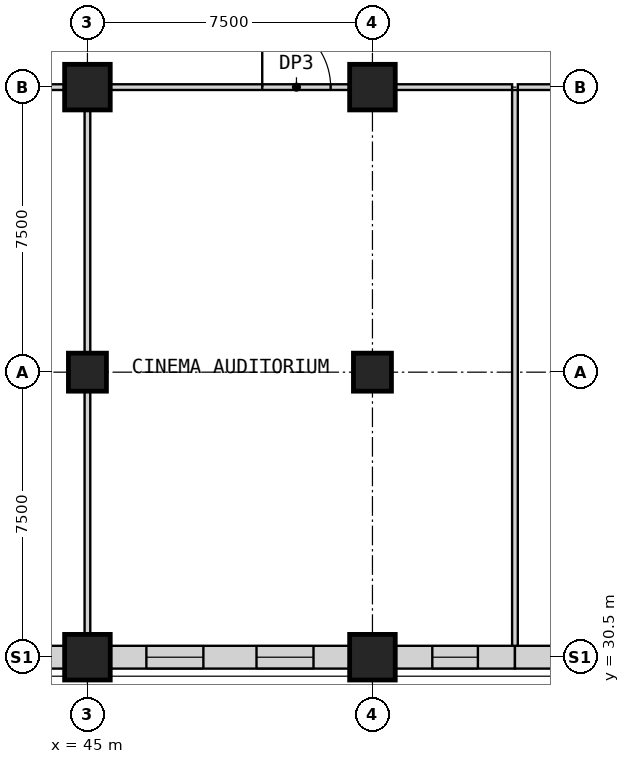
"""IFC4 building model, lengths in metres.
Left out: names, types, materials, properties, quantities, classifications, styles, units other than length and angle.
Written with IfcOpenShell. Run it as: python <this file> out.ifc"""

import sys

from ifc_helpers import new_model, si_unit, direction, frame, frame_2d, origin, origin_2d, place, context, subcontext, project, spatial, rectangle, extrude, element, fill, save


model = new_model("IFC4")
c1 = context("Model", 3, precision=1e-05, world=origin(), true_north=direction((0.0, 1.0)))
c2 = subcontext(c1, "Body", "Model", "MODEL_VIEW")
j1 = project(units=[si_unit("LENGTHUNIT", "METRE"), si_unit("PLANEANGLEUNIT", "RADIAN")], contexts=[c1])
p1 = place(None, origin())
s1 = spatial("IfcSite", under=j1, at=p1, CompositionType="ELEMENT")
p2 = place(p1, origin())
s2 = spatial("IfcBuilding", under=s1, at=p2, CompositionType="ELEMENT")
p3 = place(p2, frame((0.0, 0.0, 18.5)))
s3 = spatial("IfcBuildingStorey", under=s2, at=p3, CompositionType="ELEMENT", Elevation=18.5)
p4 = place(p3, frame((45.0, 38.0, 0.0), z_axis=(0.0, 0.0, 1.0), x_axis=(1.0, 0.0, 0.0)))
e1 = element("IfcColumn", 1, at=p4, inside=s3, PredefinedType="COLUMN", context=c2, shape_type="SweptSolid", body=[
    extrude(rectangle(XDim=1.0, YDim=1.0, at=origin_2d()), origin(), (0.0, 0.0, 1.0), 5.0),
])
p5 = place(p3, frame((45.0, 45.5, 0.0), z_axis=(0.0, 0.0, 1.0), x_axis=(1.0, 0.0, 0.0)))
e2 = element("IfcColumn", 2, at=p5, inside=s3, PredefinedType="COLUMN", context=c2, shape_type="SweptSolid", body=[
    extrude(rectangle(XDim=1.2, YDim=1.2, at=origin_2d()), origin(), (0.0, 0.0, 1.0), 5.0),
])
p6 = place(p3, frame((52.5, 38.0, 0.0), z_axis=(0.0, 0.0, 1.0), x_axis=(1.0, 0.0, 0.0)))
e3 = element("IfcColumn", 3, at=p6, inside=s3, PredefinedType="COLUMN", context=c2, shape_type="SweptSolid", body=[
    extrude(rectangle(XDim=1.0, YDim=1.0, at=origin_2d()), origin(), (0.0, 0.0, 1.0), 5.0),
])
for number, where, z_axis, x_axis in (
    (4, (52.5, 45.5, 0.0), (0.0, 0.0, 1.0), (1.0, 0.0, 0.0)),
    (5, (45.0, 30.5, 0.0), (0.0, 0.0, 1.0), (1.0, 0.0, 0.0)),
    (6, (52.5, 30.5, 0.0), (0.0, 0.0, 1.0), (1.0, 0.0, 0.0)),
):
    element("IfcColumn", number, at=place(p3, frame(where, z_axis=z_axis, x_axis=x_axis)), inside=s3, PredefinedType="COLUMN", context=c2, shape_type="SweptSolid", body=[
        extrude(rectangle(XDim=1.2, YDim=1.2, at=origin_2d()), origin(), (0.0, 0.0, 1.0), 5.0),
    ])
p7 = place(p3, frame((38.1, 30.5, 0.0), z_axis=(0.0, 0.0, 1.0), x_axis=(1.0, 0.0, 0.0)))
e7 = element("IfcWall", 7, at=p7, inside=s3, PredefinedType="PARTITIONING", context=c2, shape_type="SweptSolid", body=[
    extrude(rectangle(XDim=6.3, YDim=0.6, at=frame_2d((3.15, 0.0))), origin(), (0.0, 0.0, 1.0), 4.1),
])
p8 = place(p7, frame((0.951, 0.0, 0.9)))
e8 = element("IfcOpeningElement", 8, at=p8, cuts=e7, PredefinedType="OPENING", context=c2, shape_type="SweptSolid", body=[
    extrude(rectangle(XDim=1.5, YDim=2.8, at=frame_2d((0.75, 1.4))), frame((0.0, 0.31, 0.0), z_axis=(0.0, -1.0, 0.0), x_axis=(1.0, 0.0, 0.0)), (0.0, 0.0, 1.0), 0.62),
])
p9 = place(p7, frame((3.849, 0.0, 0.9)))
e9 = element("IfcOpeningElement", 9, at=p9, cuts=e7, PredefinedType="OPENING", context=c2, shape_type="SweptSolid", body=[
    extrude(rectangle(XDim=1.5, YDim=2.8, at=frame_2d((0.75, 1.4))), frame((0.0, 0.31, 0.0), z_axis=(0.0, -1.0, 0.0), x_axis=(1.0, 0.0, 0.0)), (0.0, 0.0, 1.0), 0.62),
])
p10 = place(p3, frame((45.6, 30.5, 0.0), z_axis=(0.0, 0.0, 1.0), x_axis=(1.0, 0.0, 0.0)))
e10 = element("IfcWall", 10, at=p10, inside=s3, PredefinedType="PARTITIONING", context=c2, shape_type="SweptSolid", body=[
    extrude(rectangle(XDim=6.3, YDim=0.6, at=frame_2d((3.15, 0.0))), origin(), (0.0, 0.0, 1.0), 4.1),
])
p11 = place(p10, frame((0.951, 0.0, 0.9)))
e11 = element("IfcOpeningElement", 11, at=p11, cuts=e10, PredefinedType="OPENING", context=c2, shape_type="SweptSolid", body=[
    extrude(rectangle(XDim=1.5, YDim=2.8, at=frame_2d((0.75, 1.4))), frame((0.0, 0.31, 0.0), z_axis=(0.0, -1.0, 0.0), x_axis=(1.0, 0.0, 0.0)), (0.0, 0.0, 1.0), 0.62),
])
p12 = place(p10, frame((3.849, 0.0, 0.9)))
e12 = element("IfcOpeningElement", 12, at=p12, cuts=e10, PredefinedType="OPENING", context=c2, shape_type="SweptSolid", body=[
    extrude(rectangle(XDim=1.5, YDim=2.8, at=frame_2d((0.75, 1.4))), frame((0.0, 0.31, 0.0), z_axis=(0.0, -1.0, 0.0), x_axis=(1.0, 0.0, 0.0)), (0.0, 0.0, 1.0), 0.62),
])
p13 = place(p3, frame((53.1, 30.5, 0.0), z_axis=(0.0, 0.0, 1.0), x_axis=(1.0, 0.0, 0.0)))
e13 = element("IfcWall", 13, at=p13, inside=s3, PredefinedType="PARTITIONING", context=c2, shape_type="SweptSolid", body=[
    extrude(rectangle(XDim=3.15, YDim=0.6, at=frame_2d((1.575, 0.0))), origin(), (0.0, 0.0, 1.0), 4.1),
])
p14 = place(p13, frame((0.975, 0.0, 0.9)))
e14 = element("IfcOpeningElement", 14, at=p14, cuts=e13, PredefinedType="OPENING", context=c2, shape_type="SweptSolid", body=[
    extrude(rectangle(XDim=1.2, YDim=2.8, at=frame_2d((0.6, 1.4))), frame((0.0, 0.31, 0.0), z_axis=(0.0, -1.0, 0.0), x_axis=(1.0, 0.0, 0.0)), (0.0, 0.0, 1.0), 0.62),
])
p15 = place(p3, frame((56.25, 30.5, 0.0), z_axis=(0.0, 0.0, 1.0), x_axis=(1.0, 0.0, 0.0)))
e15 = element("IfcWall", 15, at=p15, inside=s3, PredefinedType="PARTITIONING", context=c2, shape_type="SweptSolid", body=[
    extrude(rectangle(XDim=3.15, YDim=0.6, at=frame_2d((1.575, 0.0))), origin(), (0.0, 0.0, 1.0), 4.1),
])
p16 = place(p15, frame((0.975, 0.0, 0.9)))
e16 = element("IfcOpeningElement", 16, at=p16, cuts=e15, PredefinedType="OPENING", context=c2, shape_type="SweptSolid", body=[
    extrude(rectangle(XDim=1.2, YDim=2.8, at=frame_2d((0.6, 1.4))), frame((0.0, 0.31, 0.0), z_axis=(0.0, -1.0, 0.0), x_axis=(1.0, 0.0, 0.0)), (0.0, 0.0, 1.0), 0.62),
])
p17 = place(p3, frame((38.1, 45.5, 0.0), z_axis=(0.0, 0.0, 1.0), x_axis=(1.0, 0.0, 0.0)))
e17 = element("IfcWall", 17, at=p17, inside=s3, PredefinedType="PARTITIONING", context=c2, shape_type="SweptSolid", body=[
    extrude(rectangle(XDim=6.3, YDim=0.15, at=frame_2d((3.15, 0.0))), origin(), (0.0, 0.0, 1.0), 4.7),
])
p18 = place(p17, frame((2.25, 0.0, 0.0)))
e18 = element("IfcOpeningElement", 18, at=p18, cuts=e17, PredefinedType="OPENING", context=c2, shape_type="SweptSolid", body=[
    extrude(rectangle(XDim=1.8, YDim=2.4, at=frame_2d((0.9, 1.2))), frame((0.0, 0.085, 0.0), z_axis=(0.0, -1.0, 0.0), x_axis=(1.0, 0.0, 0.0)), (0.0, 0.0, 1.0), 0.17),
])
p19 = place(p3, frame((45.6, 45.5, 0.0), z_axis=(0.0, 0.0, 1.0), x_axis=(1.0, 0.0, 0.0)))
e19 = element("IfcWall", 19, at=p19, inside=s3, PredefinedType="PARTITIONING", context=c2, shape_type="SweptSolid", body=[
    extrude(rectangle(XDim=6.3, YDim=0.15, at=frame_2d((3.15, 0.0))), origin(), (0.0, 0.0, 1.0), 4.7),
])
p20 = place(p19, frame((4.0, 0.0, 0.0)))
e20 = element("IfcOpeningElement", 20, at=p20, cuts=e19, PredefinedType="OPENING", context=c2, shape_type="SweptSolid", body=[
    extrude(rectangle(XDim=1.8, YDim=2.4, at=frame_2d((0.9, 1.2))), frame((0.0, 0.085, 0.0), z_axis=(0.0, -1.0, 0.0), x_axis=(1.0, 0.0, 0.0)), (0.0, 0.0, 1.0), 0.17),
])
for number, where, z_axis, x_axis in (
    (21, (53.1, 45.5, 0.0), (0.0, 0.0, 1.0), (1.0, 0.0, 0.0)),
    (22, (56.325, 45.5, 0.0), (0.0, 0.0, 1.0), (1.0, 0.0, 0.0)),
):
    element("IfcWall", number, at=place(p3, frame(where, z_axis=z_axis, x_axis=x_axis)), inside=s3, PredefinedType="PARTITIONING", context=c2, shape_type="SweptSolid", body=[
        extrude(rectangle(XDim=3.075, YDim=0.15, at=frame_2d((1.538, 0.0))), origin(), (0.0, 0.0, 1.0), 4.7),
    ])
for number, where, z_axis, x_axis in (
    (23, (45.0, 31.1, 0.0), (0.0, 0.0, 1.0), (0.0, 1.0, 0.0)),
    (24, (45.0, 38.5, 0.0), (0.0, 0.0, 1.0), (0.0, 1.0, 0.0)),
):
    element("IfcWall", number, at=place(p3, frame(where, z_axis=z_axis, x_axis=x_axis)), inside=s3, PredefinedType="PARTITIONING", context=c2, shape_type="SweptSolid", body=[
        extrude(rectangle(XDim=6.4, YDim=0.15, at=frame_2d((3.2, 0.0))), origin(), (0.0, 0.0, 1.0), 4.7),
    ])
p21 = place(p3, frame((56.25, 30.8, 0.0), z_axis=(0.0, 0.0, 1.0), x_axis=(0.0, 1.0, 0.0)))
e25 = element("IfcWall", 25, at=p21, inside=s3, PredefinedType="PARTITIONING", context=c2, shape_type="SweptSolid", body=[
    extrude(rectangle(XDim=14.625, YDim=0.15, at=frame_2d((7.312, 0.0))), origin(), (0.0, 0.0, 1.0), 4.7),
])
p22 = place(p11, origin())
e26 = element("IfcWindow", 26, at=p22, inside=s3, PartitioningType="SINGLE_PANEL", PredefinedType="WINDOW", context=c2, shape_type="SweptSolid", body=[
    extrude(rectangle(XDim=1.5, YDim=2.8, at=frame_2d((0.75, 1.4))), frame((0.0, 0.03, 0.0), z_axis=(0.0, -1.0, 0.0), x_axis=(1.0, 0.0, 0.0)), (0.0, 0.0, 1.0), 0.06),
])
fill(e11, e26)
p23 = place(p12, origin())
e27 = element("IfcWindow", 27, at=p23, inside=s3, PartitioningType="SINGLE_PANEL", PredefinedType="WINDOW", context=c2, shape_type="SweptSolid", body=[
    extrude(rectangle(XDim=1.5, YDim=2.8, at=frame_2d((0.75, 1.4))), frame((0.0, 0.03, 0.0), z_axis=(0.0, -1.0, 0.0), x_axis=(1.0, 0.0, 0.0)), (0.0, 0.0, 1.0), 0.06),
])
fill(e12, e27)
p24 = place(p14, origin())
e28 = element("IfcWindow", 28, at=p24, inside=s3, PartitioningType="SINGLE_PANEL", PredefinedType="WINDOW", context=c2, shape_type="SweptSolid", body=[
    extrude(rectangle(XDim=1.2, YDim=2.8, at=frame_2d((0.6, 1.4))), frame((0.0, 0.03, 0.0), z_axis=(0.0, -1.0, 0.0), x_axis=(1.0, 0.0, 0.0)), (0.0, 0.0, 1.0), 0.06),
])
fill(e14, e28)
p25 = place(p20, origin())
e29 = element("IfcDoor", 29, at=p25, inside=s3, OperationType="SINGLE_SWING_LEFT", PredefinedType="DOOR", context=c2, shape_type="SweptSolid", body=[
    extrude(rectangle(XDim=1.8, YDim=2.4, at=frame_2d((0.9, 1.2))), frame((0.0, 0.025, 0.0), z_axis=(0.0, -1.0, 0.0), x_axis=(1.0, 0.0, 0.0)), (0.0, 0.0, 1.0), 0.05),
])
fill(e20, e29)
save(model, sys.argv[1])
